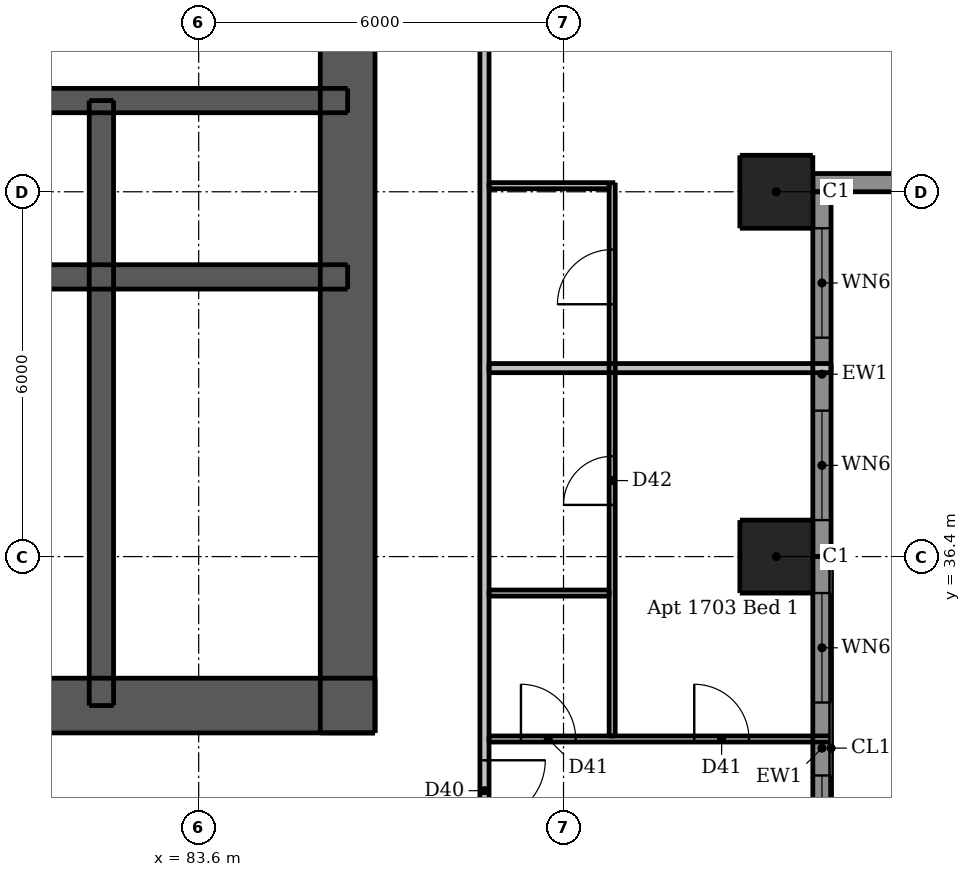
"""IFC4 building model, lengths in metres.
Left out: names, types, materials, properties, quantities, classifications, styles, units other than length and angle.
Written with IfcOpenShell. Run it as: python <this file> out.ifc"""

import sys

from ifc_helpers import new_model, si_unit, direction, frame, frame_2d, origin, origin_2d, place, context, subcontext, project, spatial, rectangle, extrude, element, fill, save


model = new_model("IFC4")
c1 = context("Model", 3, precision=1e-05, world=origin(), true_north=direction((0.0, 1.0)))
c2 = subcontext(c1, "Body", "Model", "MODEL_VIEW")
j1 = project(units=[si_unit("LENGTHUNIT", "METRE"), si_unit("PLANEANGLEUNIT", "RADIAN")], contexts=[c1])
p1 = place(None, origin())
s1 = spatial("IfcSite", under=j1, at=p1, CompositionType="ELEMENT")
p2 = place(p1, origin())
s2 = spatial("IfcBuilding", under=s1, at=p2, CompositionType="ELEMENT")
p3 = place(p2, frame((0.0, 0.0, 63.1)))
s3 = spatial("IfcBuildingStorey", under=s2, at=p3, CompositionType="ELEMENT", Elevation=63.1)
p4 = place(p3, frame((62.5, 33.95, 0.0), z_axis=(0.0, 0.0, 1.0), x_axis=(1.0, 0.0, 0.0)))
e1 = element("IfcWall", 1, at=p4, inside=s3, PredefinedType="SHEAR", context=c2, shape_type="SweptSolid", body=[
    extrude(rectangle(XDim=24.0, YDim=0.9, at=frame_2d((12.0, 0.0))), origin(), (0.0, 0.0, 1.0), 3.05),
])
p5 = place(p4, frame((2.05, 0.0, 0.0)))
e2 = element("IfcOpeningElement", 2, at=p5, cuts=e1, PredefinedType="OPENING", context=c2, shape_type="SweptSolid", body=[
    extrude(rectangle(XDim=1.1, YDim=2.1, at=frame_2d((0.55, 1.05))), frame((0.0, 0.46, 0.0), z_axis=(0.0, -1.0, 0.0), x_axis=(1.0, 0.0, 0.0)), (0.0, 0.0, 1.0), 0.92),
])
p6 = place(p4, frame((20.85, 0.0, 0.0)))
e3 = element("IfcOpeningElement", 3, at=p6, cuts=e1, PredefinedType="OPENING", context=c2, shape_type="SweptSolid", body=[
    extrude(rectangle(XDim=1.1, YDim=2.1, at=frame_2d((0.55, 1.05))), frame((0.0, 0.46, 0.0), z_axis=(0.0, -1.0, 0.0), x_axis=(1.0, 0.0, 0.0)), (0.0, 0.0, 1.0), 0.92),
])
p7 = place(p4, frame((8.0, 0.0, 0.0)))
e4 = element("IfcOpeningElement", 4, at=p7, cuts=e1, PredefinedType="OPENING", context=c2, shape_type="SweptSolid", body=[
    extrude(rectangle(XDim=1.1, YDim=2.1, at=frame_2d((0.55, 1.05))), frame((0.0, 0.46, 0.0), z_axis=(0.0, -1.0, 0.0), x_axis=(1.0, 0.0, 0.0)), (0.0, 0.0, 1.0), 0.92),
])
p8 = place(p4, frame((15.3, 0.0, 0.0)))
e5 = element("IfcOpeningElement", 5, at=p8, cuts=e1, PredefinedType="OPENING", context=c2, shape_type="SweptSolid", body=[
    extrude(rectangle(XDim=0.9, YDim=2.1, at=frame_2d((0.45, 1.05))), frame((0.0, 0.46, 0.0), z_axis=(0.0, -1.0, 0.0), x_axis=(1.0, 0.0, 0.0)), (0.0, 0.0, 1.0), 0.92),
])
p9 = place(p3, frame((86.05, 33.5, 0.0), z_axis=(0.0, 0.0, 1.0), x_axis=(0.0, 1.0, 0.0)))
e6 = element("IfcWall", 6, at=p9, inside=s3, PredefinedType="SHEAR", context=c2, shape_type="SweptSolid", body=[
    extrude(rectangle(XDim=24.0, YDim=0.9, at=frame_2d((12.0, 0.0))), origin(), (0.0, 0.0, 1.0), 3.05),
])
p10 = place(p9, frame((11.2, 0.0, 0.0)))
e7 = element("IfcOpeningElement", 7, at=p10, cuts=e6, PredefinedType="OPENING", context=c2, shape_type="SweptSolid", body=[
    extrude(rectangle(XDim=1.6, YDim=2.1, at=frame_2d((0.8, 1.05))), frame((0.0, 0.46, 0.0), z_axis=(0.0, -1.0, 0.0), x_axis=(1.0, 0.0, 0.0)), (0.0, 0.0, 1.0), 0.92),
])
p11 = place(p3, frame((62.95, 41.0, 0.0), z_axis=(0.0, 0.0, 1.0), x_axis=(1.0, 0.0, 0.0)))
e8 = element("IfcWall", 8, at=p11, inside=s3, PredefinedType="SHEAR", context=c2, shape_type="SweptSolid", body=[
    extrude(rectangle(XDim=23.1, YDim=0.4, at=frame_2d((11.55, 0.0))), origin(), (0.0, 0.0, 1.0), 3.05),
])
p12 = place(p3, frame((62.95, 43.9, 0.0), z_axis=(0.0, 0.0, 1.0), x_axis=(1.0, 0.0, 0.0)))
e9 = element("IfcWall", 9, at=p12, inside=s3, PredefinedType="SHEAR", context=c2, shape_type="SweptSolid", body=[
    extrude(rectangle(XDim=23.1, YDim=0.4, at=frame_2d((11.55, 0.0))), origin(), (0.0, 0.0, 1.0), 3.05),
])
p13 = place(p12, frame((0.662, 0.0, 0.0)))
e10 = element("IfcOpeningElement", 10, at=p13, cuts=e9, PredefinedType="OPENING", context=c2, shape_type="SweptSolid", body=[
    extrude(rectangle(XDim=0.8, YDim=2.1, at=frame_2d((0.4, 1.05))), frame((0.0, 0.21, 0.0), z_axis=(0.0, -1.0, 0.0), x_axis=(1.0, 0.0, 0.0)), (0.0, 0.0, 1.0), 0.42),
])
p14 = place(p12, frame((2.312, 0.0, 0.0)))
e11 = element("IfcOpeningElement", 11, at=p14, cuts=e9, PredefinedType="OPENING", context=c2, shape_type="SweptSolid", body=[
    extrude(rectangle(XDim=0.9, YDim=2.1, at=frame_2d((0.45, 1.05))), frame((0.0, 0.21, 0.0), z_axis=(0.0, -1.0, 0.0), x_axis=(1.0, 0.0, 0.0)), (0.0, 0.0, 1.0), 0.42),
])
p15 = place(p12, frame((20.5, 0.0, 0.0)))
e12 = element("IfcOpeningElement", 12, at=p15, cuts=e9, PredefinedType="OPENING", context=c2, shape_type="SweptSolid", body=[
    extrude(rectangle(XDim=0.9, YDim=2.1, at=frame_2d((0.45, 1.05))), frame((0.0, 0.21, 0.0), z_axis=(0.0, -1.0, 0.0), x_axis=(1.0, 0.0, 0.0)), (0.0, 0.0, 1.0), 0.42),
])
p16 = place(p12, frame((4.75, 0.0, 0.0)))
e13 = element("IfcOpeningElement", 13, at=p16, cuts=e9, PredefinedType="OPENING", context=c2, shape_type="SweptSolid", body=[
    extrude(rectangle(XDim=1.1, YDim=2.1, at=frame_2d((0.55, 1.05))), frame((0.0, 0.21, 0.0), z_axis=(0.0, -1.0, 0.0), x_axis=(1.0, 0.0, 0.0)), (0.0, 0.0, 1.0), 0.42),
])
p17 = place(p12, frame((7.25, 0.0, 0.0)))
e14 = element("IfcOpeningElement", 14, at=p17, cuts=e9, PredefinedType="OPENING", context=c2, shape_type="SweptSolid", body=[
    extrude(rectangle(XDim=1.1, YDim=2.1, at=frame_2d((0.55, 1.05))), frame((0.0, 0.21, 0.0), z_axis=(0.0, -1.0, 0.0), x_axis=(1.0, 0.0, 0.0)), (0.0, 0.0, 1.0), 0.42),
])
p18 = place(p12, frame((9.75, 0.0, 0.0)))
e15 = element("IfcOpeningElement", 15, at=p18, cuts=e9, PredefinedType="OPENING", context=c2, shape_type="SweptSolid", body=[
    extrude(rectangle(XDim=1.1, YDim=2.1, at=frame_2d((0.55, 1.05))), frame((0.0, 0.21, 0.0), z_axis=(0.0, -1.0, 0.0), x_axis=(1.0, 0.0, 0.0)), (0.0, 0.0, 1.0), 0.42),
])
p19 = place(p12, frame((12.25, 0.0, 0.0)))
e16 = element("IfcOpeningElement", 16, at=p19, cuts=e9, PredefinedType="OPENING", context=c2, shape_type="SweptSolid", body=[
    extrude(rectangle(XDim=1.1, YDim=2.1, at=frame_2d((0.55, 1.05))), frame((0.0, 0.21, 0.0), z_axis=(0.0, -1.0, 0.0), x_axis=(1.0, 0.0, 0.0)), (0.0, 0.0, 1.0), 0.42),
])
p20 = place(p12, frame((14.75, 0.0, 0.0)))
e17 = element("IfcOpeningElement", 17, at=p20, cuts=e9, PredefinedType="OPENING", context=c2, shape_type="SweptSolid", body=[
    extrude(rectangle(XDim=1.1, YDim=2.1, at=frame_2d((0.55, 1.05))), frame((0.0, 0.21, 0.0), z_axis=(0.0, -1.0, 0.0), x_axis=(1.0, 0.0, 0.0)), (0.0, 0.0, 1.0), 0.42),
])
p21 = place(p12, frame((17.25, 0.0, 0.0)))
e18 = element("IfcOpeningElement", 18, at=p21, cuts=e9, PredefinedType="OPENING", context=c2, shape_type="SweptSolid", body=[
    extrude(rectangle(XDim=1.1, YDim=2.1, at=frame_2d((0.55, 1.05))), frame((0.0, 0.21, 0.0), z_axis=(0.0, -1.0, 0.0), x_axis=(1.0, 0.0, 0.0)), (0.0, 0.0, 1.0), 0.42),
])
p22 = place(p3, frame((82.0, 33.95, 0.0), z_axis=(0.0, 0.0, 1.0), x_axis=(0.0, 1.0, 0.0)))
e19 = element("IfcWall", 19, at=p22, inside=s3, PredefinedType="SHEAR", context=c2, shape_type="SweptSolid", body=[
    extrude(rectangle(XDim=9.95, YDim=0.4, at=frame_2d((4.975, 0.0))), origin(), (0.0, 0.0, 1.0), 3.05),
])
for number, where, z_axis, x_axis in (
    (20, (93.1, 36.4, 0.0), (0.0, 0.0, 1.0), (1.0, 0.0, 0.0)),
    (21, (93.1, 42.4, 0.0), (0.0, 0.0, 1.0), (1.0, 0.0, 0.0)),
):
    element("IfcColumn", number, at=place(p3, frame(where, z_axis=z_axis, x_axis=x_axis)), inside=s3, PredefinedType="COLUMN", context=c2, shape_type="SweptSolid", body=[
        extrude(rectangle(XDim=1.2, YDim=1.2, at=origin_2d()), origin(), (0.0, 0.0, 1.0), 3.05),
    ])
p23 = place(p3, frame((93.7, 42.55, 0.0), z_axis=(0.0, 0.0, 1.0), x_axis=(1.0, 0.0, 0.0)))
e22 = element("IfcWall", 22, at=p23, inside=s3, PredefinedType="SOLIDWALL", context=c2, shape_type="SweptSolid", body=[
    extrude(rectangle(XDim=4.8, YDim=0.3, at=frame_2d((2.4, 0.0))), origin(), (0.0, 0.0, 1.0), 3.05),
])
p24 = place(p23, frame((1.35, 0.0, 0.15)))
e23 = element("IfcOpeningElement", 23, at=p24, cuts=e22, PredefinedType="OPENING", context=c2, shape_type="SweptSolid", body=[
    extrude(rectangle(XDim=2.4, YDim=2.1, at=frame_2d((1.2, 1.05))), frame((0.0, 0.16, 0.0), z_axis=(0.0, -1.0, 0.0), x_axis=(1.0, 0.0, 0.0)), (0.0, 0.0, 1.0), 0.32),
])
p25 = place(p3, frame((93.85, 30.1, 0.0), z_axis=(0.0, 0.0, 1.0), x_axis=(0.0, 1.0, 0.0)))
e24 = element("IfcWall", 24, at=p25, inside=s3, PredefinedType="SOLIDWALL", context=c2, shape_type="SweptSolid", body=[
    extrude(rectangle(XDim=6.3, YDim=0.3, at=frame_2d((3.15, 0.0))), origin(), (0.0, 0.0, 1.0), 3.05),
])
p26 = place(p25, frame((0.9, 0.0, 0.15)))
e25 = element("IfcOpeningElement", 25, at=p26, cuts=e24, PredefinedType="OPENING", context=c2, shape_type="SweptSolid", body=[
    extrude(rectangle(XDim=1.8, YDim=2.1, at=frame_2d((0.9, 1.05))), frame((0.0, 0.16, 0.0), z_axis=(0.0, -1.0, 0.0), x_axis=(1.0, 0.0, 0.0)), (0.0, 0.0, 1.0), 0.32),
])
p27 = place(p25, frame((3.9, 0.0, 0.15)))
e26 = element("IfcOpeningElement", 26, at=p27, cuts=e24, PredefinedType="OPENING", context=c2, shape_type="SweptSolid", body=[
    extrude(rectangle(XDim=1.8, YDim=2.1, at=frame_2d((0.9, 1.05))), frame((0.0, 0.16, 0.0), z_axis=(0.0, -1.0, 0.0), x_axis=(1.0, 0.0, 0.0)), (0.0, 0.0, 1.0), 0.32),
])
p28 = place(p3, frame((93.85, 36.4, 0.0), z_axis=(0.0, 0.0, 1.0), x_axis=(0.0, 1.0, 0.0)))
e27 = element("IfcWall", 27, at=p28, inside=s3, PredefinedType="SOLIDWALL", context=c2, shape_type="SweptSolid", body=[
    extrude(rectangle(XDim=6.0, YDim=0.3, at=frame_2d((3.0, 0.0))), origin(), (0.0, 0.0, 1.0), 3.05),
])
p29 = place(p28, frame((0.6, 0.0, 0.15)))
e28 = element("IfcOpeningElement", 28, at=p29, cuts=e27, PredefinedType="OPENING", context=c2, shape_type="SweptSolid", body=[
    extrude(rectangle(XDim=1.8, YDim=2.1, at=frame_2d((0.9, 1.05))), frame((0.0, 0.16, 0.0), z_axis=(0.0, -1.0, 0.0), x_axis=(1.0, 0.0, 0.0)), (0.0, 0.0, 1.0), 0.32),
])
p30 = place(p28, frame((3.6, 0.0, 0.15)))
e29 = element("IfcOpeningElement", 29, at=p30, cuts=e27, PredefinedType="OPENING", context=c2, shape_type="SweptSolid", body=[
    extrude(rectangle(XDim=1.8, YDim=2.1, at=frame_2d((0.9, 1.05))), frame((0.0, 0.16, 0.0), z_axis=(0.0, -1.0, 0.0), x_axis=(1.0, 0.0, 0.0)), (0.0, 0.0, 1.0), 0.32),
])
p31 = place(p3, frame((90.4, 33.45, 0.0), z_axis=(0.0, 0.0, 1.0), x_axis=(0.0, 1.0, 0.0)))
e30 = element("IfcWall", 30, at=p31, inside=s3, PredefinedType="PARTITIONING", context=c2, shape_type="SweptSolid", body=[
    extrude(rectangle(XDim=9.1, YDim=0.1, at=frame_2d((4.55, 0.0))), origin(), (0.0, 0.0, 1.0), 3.05),
])
p32 = place(p31, frame((3.8, 0.0, 0.0)))
e31 = element("IfcOpeningElement", 31, at=p32, cuts=e30, PredefinedType="OPENING", context=c2, shape_type="SweptSolid", body=[
    extrude(rectangle(XDim=0.8, YDim=2.1, at=frame_2d((0.4, 1.05))), frame((0.0, 0.06, 0.0), z_axis=(0.0, -1.0, 0.0), x_axis=(1.0, 0.0, 0.0)), (0.0, 0.0, 1.0), 0.12),
])
p33 = place(p31, frame((7.1, 0.0, 0.0)))
e32 = element("IfcOpeningElement", 32, at=p33, cuts=e30, PredefinedType="OPENING", context=c2, shape_type="SweptSolid", body=[
    extrude(rectangle(XDim=0.9, YDim=2.1, at=frame_2d((0.45, 1.05))), frame((0.0, 0.06, 0.0), z_axis=(0.0, -1.0, 0.0), x_axis=(1.0, 0.0, 0.0)), (0.0, 0.0, 1.0), 0.12),
])
p34 = place(p3, frame((88.375, 42.5, 0.0), z_axis=(0.0, 0.0, 1.0), x_axis=(1.0, 0.0, 0.0)))
e33 = element("IfcWall", 33, at=p34, inside=s3, PredefinedType="PARTITIONING", context=c2, shape_type="SweptSolid", body=[
    extrude(rectangle(XDim=1.975, YDim=0.1, at=frame_2d((0.988, 0.0))), origin(), (0.0, 0.0, 1.0), 2.59),
])
p35 = place(p3, frame((88.375, 35.8, 0.0), z_axis=(0.0, 0.0, 1.0), x_axis=(1.0, 0.0, 0.0)))
e34 = element("IfcWall", 34, at=p35, inside=s3, PredefinedType="PARTITIONING", context=c2, shape_type="SweptSolid", body=[
    extrude(rectangle(XDim=1.975, YDim=0.1, at=frame_2d((0.988, 0.0))), origin(), (0.0, 0.0, 1.0), 3.05),
])
p36 = place(p3, frame((88.375, 33.4, 0.0), z_axis=(0.0, 0.0, 1.0), x_axis=(1.0, 0.0, 0.0)))
e35 = element("IfcWall", 35, at=p36, inside=s3, PredefinedType="PARTITIONING", context=c2, shape_type="SweptSolid", body=[
    extrude(rectangle(XDim=5.625, YDim=0.1, at=frame_2d((2.812, 0.0))), origin(), (0.0, 0.0, 1.0), 3.05),
])
p37 = place(p36, frame((0.525, 0.0, 0.0)))
e36 = element("IfcOpeningElement", 36, at=p37, cuts=e35, PredefinedType="OPENING", context=c2, shape_type="SweptSolid", body=[
    extrude(rectangle(XDim=0.9, YDim=2.1, at=frame_2d((0.45, 1.05))), frame((0.0, 0.06, 0.0), z_axis=(0.0, -1.0, 0.0), x_axis=(1.0, 0.0, 0.0)), (0.0, 0.0, 1.0), 0.12),
])
p38 = place(p36, frame((3.375, 0.0, 0.0)))
e37 = element("IfcOpeningElement", 37, at=p38, cuts=e35, PredefinedType="OPENING", context=c2, shape_type="SweptSolid", body=[
    extrude(rectangle(XDim=0.9, YDim=2.1, at=frame_2d((0.45, 1.05))), frame((0.0, 0.06, 0.0), z_axis=(0.0, -1.0, 0.0), x_axis=(1.0, 0.0, 0.0)), (0.0, 0.0, 1.0), 0.12),
])
p39 = place(p3, frame((88.3, 60.475, 0.0), z_axis=(0.0, 0.0, 1.0), x_axis=(0.0, -1.0, 0.0)))
e38 = element("IfcWall", 38, at=p39, inside=s3, PredefinedType="PARTITIONING", context=c2, shape_type="SweptSolid", body=[
    extrude(rectangle(XDim=28.7, YDim=0.15, at=frame_2d((14.35, 0.0))), origin(), (0.0, 0.0, 1.0), 3.05),
])
p40 = place(p39, frame((27.425, 0.0, 0.0)))
e39 = element("IfcOpeningElement", 39, at=p40, cuts=e38, PredefinedType="OPENING", context=c2, shape_type="SweptSolid", body=[
    extrude(rectangle(XDim=1.0, YDim=2.1, at=frame_2d((0.5, 1.05))), frame((0.0, 0.085, 0.0), z_axis=(0.0, -1.0, 0.0), x_axis=(1.0, 0.0, 0.0)), (0.0, 0.0, 1.0), 0.17),
])
p41 = place(p39, frame((14.525, 0.0, 0.0)))
e40 = element("IfcOpeningElement", 40, at=p41, cuts=e38, PredefinedType="OPENING", context=c2, shape_type="SweptSolid", body=[
    extrude(rectangle(XDim=1.0, YDim=2.1, at=frame_2d((0.5, 1.05))), frame((0.0, 0.085, 0.0), z_axis=(0.0, -1.0, 0.0), x_axis=(1.0, 0.0, 0.0)), (0.0, 0.0, 1.0), 0.17),
])
p42 = place(p39, frame((3.775, 0.0, 0.0)))
e41 = element("IfcOpeningElement", 41, at=p42, cuts=e38, PredefinedType="OPENING", context=c2, shape_type="SweptSolid", body=[
    extrude(rectangle(XDim=1.0, YDim=2.1, at=frame_2d((0.5, 1.05))), frame((0.0, 0.085, 0.0), z_axis=(0.0, -1.0, 0.0), x_axis=(1.0, 0.0, 0.0)), (0.0, 0.0, 1.0), 0.17),
])
p43 = place(p3, frame((88.375, 39.5, 0.0), z_axis=(0.0, 0.0, 1.0), x_axis=(1.0, 0.0, 0.0)))
e42 = element("IfcWall", 42, at=p43, inside=s3, PredefinedType="PARTITIONING", context=c2, shape_type="SweptSolid", body=[
    extrude(rectangle(XDim=5.625, YDim=0.15, at=frame_2d((2.812, 0.0))), origin(), (0.0, 0.0, 1.0), 3.05),
])
p44 = place(p26, origin())
e43 = element("IfcWindow", 43, at=p44, inside=s3, PartitioningType="DOUBLE_PANEL_VERTICAL", PredefinedType="WINDOW", context=c2, shape_type="SweptSolid", body=[
    extrude(rectangle(XDim=1.8, YDim=2.1, at=frame_2d((0.9, 1.05))), frame((0.0, 0.03, 0.0), z_axis=(0.0, -1.0, 0.0), x_axis=(1.0, 0.0, 0.0)), (0.0, 0.0, 1.0), 0.06),
])
fill(e25, e43)
p45 = place(p27, origin())
e44 = element("IfcWindow", 44, at=p45, inside=s3, PartitioningType="DOUBLE_PANEL_VERTICAL", PredefinedType="WINDOW", context=c2, shape_type="SweptSolid", body=[
    extrude(rectangle(XDim=1.8, YDim=2.1, at=frame_2d((0.9, 1.05))), frame((0.0, 0.03, 0.0), z_axis=(0.0, -1.0, 0.0), x_axis=(1.0, 0.0, 0.0)), (0.0, 0.0, 1.0), 0.06),
])
fill(e26, e44)
p46 = place(p29, origin())
e45 = element("IfcWindow", 45, at=p46, inside=s3, PartitioningType="DOUBLE_PANEL_VERTICAL", PredefinedType="WINDOW", context=c2, shape_type="SweptSolid", body=[
    extrude(rectangle(XDim=1.8, YDim=2.1, at=frame_2d((0.9, 1.05))), frame((0.0, 0.03, 0.0), z_axis=(0.0, -1.0, 0.0), x_axis=(1.0, 0.0, 0.0)), (0.0, 0.0, 1.0), 0.06),
])
fill(e28, e45)
p47 = place(p30, origin())
e46 = element("IfcWindow", 46, at=p47, inside=s3, PartitioningType="DOUBLE_PANEL_VERTICAL", PredefinedType="WINDOW", context=c2, shape_type="SweptSolid", body=[
    extrude(rectangle(XDim=1.8, YDim=2.1, at=frame_2d((0.9, 1.05))), frame((0.0, 0.03, 0.0), z_axis=(0.0, -1.0, 0.0), x_axis=(1.0, 0.0, 0.0)), (0.0, 0.0, 1.0), 0.06),
])
fill(e29, e46)
p48 = place(p6, origin())
e47 = element("IfcDoor", 47, at=p48, inside=s3, OperationType="SINGLE_SWING_RIGHT", PredefinedType="DOOR", context=c2, shape_type="SweptSolid", body=[
    extrude(rectangle(XDim=1.1, YDim=2.1, at=frame_2d((0.55, 1.05))), frame((0.0, 0.438, 0.0), z_axis=(0.0, -1.0, 0.0), x_axis=(1.0, 0.0, 0.0)), (0.0, 0.0, 1.0), 0.05),
])
fill(e3, e47)
p49 = place(p15, origin())
e48 = element("IfcDoor", 48, at=p49, inside=s3, OperationType="SINGLE_SWING_LEFT", PredefinedType="DOOR", context=c2, shape_type="SweptSolid", body=[
    extrude(rectangle(XDim=0.9, YDim=2.1, at=frame_2d((0.45, 1.05))), frame((0.0, -0.138, 0.0), z_axis=(0.0, -1.0, 0.0), x_axis=(1.0, 0.0, 0.0)), (0.0, 0.0, 1.0), 0.05),
])
fill(e12, e48)
p50 = place(p21, origin())
e49 = element("IfcDoor", 49, at=p50, inside=s3, OperationType="DOUBLE_DOOR_SLIDING", PredefinedType="DOOR", context=c2, shape_type="SweptSolid", body=[
    extrude(rectangle(XDim=1.1, YDim=2.1, at=frame_2d((0.55, 1.05))), frame((0.0, 0.025, 0.0), z_axis=(0.0, -1.0, 0.0), x_axis=(1.0, 0.0, 0.0)), (0.0, 0.0, 1.0), 0.05),
])
fill(e18, e49)
p51 = place(p40, origin())
e50 = element("IfcDoor", 50, at=p51, inside=s3, OperationType="SINGLE_SWING_LEFT", PredefinedType="DOOR", context=c2, shape_type="SweptSolid", body=[
    extrude(rectangle(XDim=1.0, YDim=2.1, at=frame_2d((0.5, 1.05))), frame((0.0, 0.025, 0.0), z_axis=(0.0, -1.0, 0.0), x_axis=(1.0, 0.0, 0.0)), (0.0, 0.0, 1.0), 0.05),
])
fill(e39, e50)
p52 = place(p37, origin())
e51 = element("IfcDoor", 51, at=p52, inside=s3, OperationType="SINGLE_SWING_LEFT", PredefinedType="DOOR", context=c2, shape_type="SweptSolid", body=[
    extrude(rectangle(XDim=0.9, YDim=2.1, at=frame_2d((0.45, 1.05))), frame((0.0, 0.025, 0.0), z_axis=(0.0, -1.0, 0.0), x_axis=(1.0, 0.0, 0.0)), (0.0, 0.0, 1.0), 0.05),
])
fill(e36, e51)
p53 = place(p38, origin())
e52 = element("IfcDoor", 52, at=p53, inside=s3, OperationType="SINGLE_SWING_LEFT", PredefinedType="DOOR", context=c2, shape_type="SweptSolid", body=[
    extrude(rectangle(XDim=0.9, YDim=2.1, at=frame_2d((0.45, 1.05))), frame((0.0, 0.025, 0.0), z_axis=(0.0, -1.0, 0.0), x_axis=(1.0, 0.0, 0.0)), (0.0, 0.0, 1.0), 0.05),
])
fill(e37, e52)
p54 = place(p32, origin())
e53 = element("IfcDoor", 53, at=p54, inside=s3, OperationType="SINGLE_SWING_LEFT", PredefinedType="DOOR", context=c2, shape_type="SweptSolid", body=[
    extrude(rectangle(XDim=0.8, YDim=2.1, at=frame_2d((0.4, 1.05))), frame((0.0, 0.025, 0.0), z_axis=(0.0, -1.0, 0.0), x_axis=(1.0, 0.0, 0.0)), (0.0, 0.0, 1.0), 0.05),
])
fill(e31, e53)
p55 = place(p33, origin())
e54 = element("IfcDoor", 54, at=p55, inside=s3, OperationType="SINGLE_SWING_LEFT", PredefinedType="DOOR", context=c2, shape_type="SweptSolid", body=[
    extrude(rectangle(XDim=0.9, YDim=2.1, at=frame_2d((0.45, 1.05))), frame((0.0, 0.025, 0.0), z_axis=(0.0, -1.0, 0.0), x_axis=(1.0, 0.0, 0.0)), (0.0, 0.0, 1.0), 0.05),
])
fill(e32, e54)
save(model, sys.argv[1])
